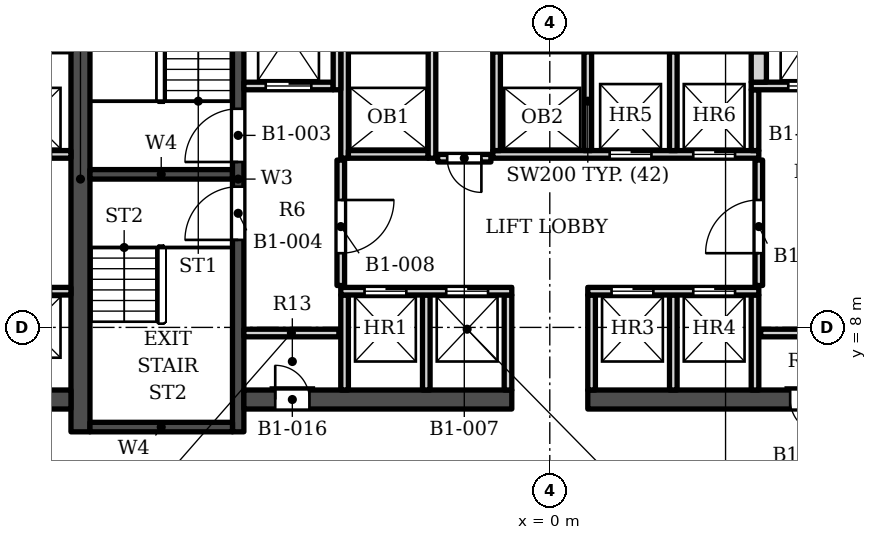
"""IFC4 building model, lengths in metres.
Left out: names, types, materials, properties, quantities, classifications, styles, units other than length and angle.
Written with IfcOpenShell. Run it as: python <this file> out.ifc"""

import sys

from ifc_helpers import new_model, si_unit, direction, frame, frame_2d, origin, place, context, subcontext, project, spatial, rectangle, extrude, element, fill, save


model = new_model("IFC4")
c1 = context("Model", 3, precision=1e-05, world=origin(), true_north=direction((0.0, 1.0)))
c2 = subcontext(c1, "Body", "Model", "MODEL_VIEW")
j1 = project(units=[si_unit("LENGTHUNIT", "METRE"), si_unit("PLANEANGLEUNIT", "RADIAN")], contexts=[c1])
p1 = place(None, origin())
s1 = spatial("IfcSite", under=j1, at=p1, CompositionType="ELEMENT")
p2 = place(p1, origin())
s2 = spatial("IfcBuilding", under=s1, at=p2, CompositionType="ELEMENT")
p3 = place(p2, frame((0.0, 0.0, -5.0)))
s3 = spatial("IfcBuildingStorey", under=s2, at=p3, CompositionType="ELEMENT", Elevation=-5.0)
p4 = place(p3, frame((-12.35, 5.253, 0.0), z_axis=(0.0, 0.0, 1.0), x_axis=(0.0, 1.0, 0.0)))
e1 = element("IfcWall", 1, at=p4, inside=s3, PredefinedType="SHEAR", context=c2, shape_type="SweptSolid", body=[
    extrude(rectangle(XDim=13.3, YDim=0.5, at=frame_2d((6.65, 0.0))), origin(), (0.0, 0.0, 1.0), 5.0),
])
p5 = place(p3, frame((-8.2, 5.253, 0.0), z_axis=(0.0, 0.0, 1.0), x_axis=(0.0, 1.0, 0.0)))
e2 = element("IfcWall", 2, at=p5, inside=s3, PredefinedType="SHEAR", context=c2, shape_type="SweptSolid", body=[
    extrude(rectangle(XDim=13.3, YDim=0.3, at=frame_2d((6.65, 0.0))), origin(), (0.0, 0.0, 1.0), 5.0),
])
p6 = place(p5, frame((7.1, 0.0, 0.0)))
e3 = element("IfcOpeningElement", 3, at=p6, cuts=e2, PredefinedType="OPENING", context=c2, shape_type="SweptSolid", body=[
    extrude(rectangle(XDim=1.4, YDim=2.1, at=frame_2d((0.7, 1.05))), frame((0.0, 0.16, 0.0), z_axis=(0.0, -1.0, 0.0), x_axis=(1.0, 0.0, 0.0)), (0.0, 0.0, 1.0), 0.32),
])
p7 = place(p5, frame((5.05, 0.0, 0.0)))
e4 = element("IfcOpeningElement", 4, at=p7, cuts=e2, PredefinedType="OPENING", context=c2, shape_type="SweptSolid", body=[
    extrude(rectangle(XDim=1.4, YDim=2.1, at=frame_2d((0.7, 1.05))), frame((0.0, 0.16, 0.0), z_axis=(0.0, -1.0, 0.0), x_axis=(1.0, 0.0, 0.0)), (0.0, 0.0, 1.0), 0.32),
])
for number, where, z_axis, x_axis in (
    (5, (-12.1, 12.028, 0.0), (0.0, 0.0, 1.0), (1.0, 0.0, 0.0)),
    (6, (-12.1, 5.378, 0.0), (0.0, 0.0, 1.0), (1.0, 0.0, 0.0)),
):
    element("IfcWall", number, at=place(p3, frame(where, z_axis=z_axis, x_axis=x_axis)), inside=s3, PredefinedType="SHEAR", context=c2, shape_type="SweptSolid", body=[
        extrude(rectangle(XDim=3.75, YDim=0.25, at=frame_2d((1.875, 0.0))), origin(), (0.0, 0.0, 1.0), 5.0),
    ])
p8 = place(p3, frame((-8.05, 6.103, 0.0), z_axis=(0.0, 0.0, 1.0), x_axis=(1.0, 0.0, 0.0)))
e7 = element("IfcWall", 7, at=p8, inside=s3, PredefinedType="SHEAR", context=c2, shape_type="SweptSolid", body=[
    extrude(rectangle(XDim=7.05, YDim=0.5, at=frame_2d((3.525, 0.0))), origin(), (0.0, 0.0, 1.0), 5.0),
])
p9 = place(p8, frame((0.825, 0.0, 0.0)))
e8 = element("IfcOpeningElement", 8, at=p9, cuts=e7, PredefinedType="OPENING", context=c2, shape_type="SweptSolid", body=[
    extrude(rectangle(XDim=0.9, YDim=2.1, at=frame_2d((0.45, 1.05))), frame((0.0, 0.26, 0.0), z_axis=(0.0, -1.0, 0.0), x_axis=(1.0, 0.0, 0.0)), (0.0, 0.0, 1.0), 0.52),
])
p10 = place(p3, frame((1.0, 6.103, 0.0), z_axis=(0.0, 0.0, 1.0), x_axis=(1.0, 0.0, 0.0)))
e9 = element("IfcWall", 9, at=p10, inside=s3, PredefinedType="SHEAR", context=c2, shape_type="SweptSolid", body=[
    extrude(rectangle(XDim=7.05, YDim=0.5, at=frame_2d((3.525, 0.0))), origin(), (0.0, 0.0, 1.0), 5.0),
])
p11 = place(p10, frame((5.325, 0.0, 0.0)))
e10 = element("IfcOpeningElement", 10, at=p11, cuts=e9, PredefinedType="OPENING", context=c2, shape_type="SweptSolid", body=[
    extrude(rectangle(XDim=0.9, YDim=2.1, at=frame_2d((0.45, 1.05))), frame((0.0, 0.26, 0.0), z_axis=(0.0, -1.0, 0.0), x_axis=(1.0, 0.0, 0.0)), (0.0, 0.0, 1.0), 0.52),
])
p12 = place(p3, frame((-12.6, 6.103, 0.0), z_axis=(0.0, 0.0, 1.0), x_axis=(-1.0, 0.0, 0.0)))
e11 = element("IfcWall", 11, at=p12, inside=s3, PredefinedType="SHEAR", context=c2, shape_type="SweptSolid", body=[
    extrude(rectangle(XDim=4.3, YDim=0.5, at=frame_2d((2.15, 0.0))), origin(), (0.0, 0.0, 1.0), 5.0),
])
for number, where, z_axis, x_axis in (
    (12, (-5.4, 6.353, 0.0), (0.0, 0.0, 1.0), (0.0, 1.0, 0.0)),
    (13, (-3.25, 6.353, 0.0), (0.0, 0.0, 1.0), (0.0, 1.0, 0.0)),
    (14, (-1.1, 6.353, 0.0), (0.0, 0.0, 1.0), (0.0, 1.0, 0.0)),
    (15, (1.1, 6.353, 0.0), (0.0, 0.0, 1.0), (0.0, 1.0, 0.0)),
    (16, (3.25, 6.353, 0.0), (0.0, 0.0, 1.0), (0.0, 1.0, 0.0)),
    (17, (5.4, 6.353, 0.0), (0.0, 0.0, 1.0), (0.0, 1.0, 0.0)),
    (18, (-8.05, 7.853, 0.0), (0.0, 0.0, 1.0), (1.0, 0.0, 0.0)),
    (19, (5.55, 7.853, 0.0), (0.0, 0.0, 1.0), (1.0, 0.0, 0.0)),
):
    element("IfcWall", number, at=place(p3, frame(where, z_axis=z_axis, x_axis=x_axis)), inside=s3, PredefinedType="SOLIDWALL", context=c2, shape_type="SweptSolid", body=[
        extrude(rectangle(XDim=2.5, YDim=0.2, at=frame_2d((1.25, 0.0))), origin(), (0.0, 0.0, 1.0), 4.45),
    ])
p13 = place(p3, frame((-16.9, 8.953, 0.0), z_axis=(0.0, 0.0, 1.0), x_axis=(1.0, 0.0, 0.0)))
e20 = element("IfcWall", 20, at=p13, inside=s3, PredefinedType="SOLIDWALL", context=c2, shape_type="SweptSolid", body=[
    extrude(rectangle(XDim=4.3, YDim=0.2, at=frame_2d((2.15, 0.0))), origin(), (0.0, 0.0, 1.0), 4.45),
])
p14 = place(p13, frame((2.675, 0.0, 0.0)))
e21 = element("IfcOpeningElement", 21, at=p14, cuts=e20, PredefinedType="OPENING", context=c2, shape_type="SweptSolid", body=[
    extrude(rectangle(XDim=1.1, YDim=2.1, at=frame_2d((0.55, 1.05))), frame((0.0, 0.11, 0.0), z_axis=(0.0, -1.0, 0.0), x_axis=(1.0, 0.0, 0.0)), (0.0, 0.0, 1.0), 0.22),
])
p15 = place(p13, frame((0.425, 0.0, 0.0)))
e22 = element("IfcOpeningElement", 22, at=p15, cuts=e20, PredefinedType="OPENING", context=c2, shape_type="SweptSolid", body=[
    extrude(rectangle(XDim=1.1, YDim=2.1, at=frame_2d((0.55, 1.05))), frame((0.0, 0.11, 0.0), z_axis=(0.0, -1.0, 0.0), x_axis=(1.0, 0.0, 0.0)), (0.0, 0.0, 1.0), 0.22),
])
p16 = place(p3, frame((-5.5, 8.953, 0.0), z_axis=(0.0, 0.0, 1.0), x_axis=(1.0, 0.0, 0.0)))
e23 = element("IfcWall", 23, at=p16, inside=s3, PredefinedType="SOLIDWALL", context=c2, shape_type="SweptSolid", body=[
    extrude(rectangle(XDim=4.5, YDim=0.2, at=frame_2d((2.25, 0.0))), origin(), (0.0, 0.0, 1.0), 4.45),
])
p17 = place(p16, frame((0.625, 0.0, 0.0)))
e24 = element("IfcOpeningElement", 24, at=p17, cuts=e23, PredefinedType="OPENING", context=c2, shape_type="SweptSolid", body=[
    extrude(rectangle(XDim=1.1, YDim=2.1, at=frame_2d((0.55, 1.05))), frame((0.0, 0.11, 0.0), z_axis=(0.0, -1.0, 0.0), x_axis=(1.0, 0.0, 0.0)), (0.0, 0.0, 1.0), 0.22),
])
p18 = place(p16, frame((2.775, 0.0, 0.0)))
e25 = element("IfcOpeningElement", 25, at=p18, cuts=e23, PredefinedType="OPENING", context=c2, shape_type="SweptSolid", body=[
    extrude(rectangle(XDim=1.1, YDim=2.1, at=frame_2d((0.55, 1.05))), frame((0.0, 0.11, 0.0), z_axis=(0.0, -1.0, 0.0), x_axis=(1.0, 0.0, 0.0)), (0.0, 0.0, 1.0), 0.22),
])
p19 = place(p3, frame((1.0, 8.953, 0.0), z_axis=(0.0, 0.0, 1.0), x_axis=(1.0, 0.0, 0.0)))
e26 = element("IfcWall", 26, at=p19, inside=s3, PredefinedType="SOLIDWALL", context=c2, shape_type="SweptSolid", body=[
    extrude(rectangle(XDim=4.5, YDim=0.2, at=frame_2d((2.25, 0.0))), origin(), (0.0, 0.0, 1.0), 4.45),
])
p20 = place(p19, frame((0.625, 0.0, 0.0)))
e27 = element("IfcOpeningElement", 27, at=p20, cuts=e26, PredefinedType="OPENING", context=c2, shape_type="SweptSolid", body=[
    extrude(rectangle(XDim=1.1, YDim=2.1, at=frame_2d((0.55, 1.05))), frame((0.0, 0.11, 0.0), z_axis=(0.0, -1.0, 0.0), x_axis=(1.0, 0.0, 0.0)), (0.0, 0.0, 1.0), 0.22),
])
p21 = place(p19, frame((2.775, 0.0, 0.0)))
e28 = element("IfcOpeningElement", 28, at=p21, cuts=e26, PredefinedType="OPENING", context=c2, shape_type="SweptSolid", body=[
    extrude(rectangle(XDim=1.1, YDim=2.1, at=frame_2d((0.55, 1.05))), frame((0.0, 0.11, 0.0), z_axis=(0.0, -1.0, 0.0), x_axis=(1.0, 0.0, 0.0)), (0.0, 0.0, 1.0), 0.22),
])
p22 = place(p3, frame((-5.5, 9.103, 0.0), z_axis=(0.0, 0.0, 1.0), x_axis=(0.0, 1.0, 0.0)))
e29 = element("IfcWall", 29, at=p22, inside=s3, PredefinedType="SOLIDWALL", context=c2, shape_type="SweptSolid", body=[
    extrude(rectangle(XDim=3.3, YDim=0.2, at=frame_2d((1.65, 0.0))), origin(), (0.0, 0.0, 1.0), 4.45),
])
p23 = place(p22, frame((0.85, 0.0, 0.0)))
e30 = element("IfcOpeningElement", 30, at=p23, cuts=e29, PredefinedType="OPENING", context=c2, shape_type="SweptSolid", body=[
    extrude(rectangle(XDim=1.4, YDim=2.1, at=frame_2d((0.7, 1.05))), frame((0.0, 0.11, 0.0), z_axis=(0.0, -1.0, 0.0), x_axis=(1.0, 0.0, 0.0)), (0.0, 0.0, 1.0), 0.22),
])
p24 = place(p3, frame((5.5, 9.103, 0.0), z_axis=(0.0, 0.0, 1.0), x_axis=(0.0, 1.0, 0.0)))
e31 = element("IfcWall", 31, at=p24, inside=s3, PredefinedType="SOLIDWALL", context=c2, shape_type="SweptSolid", body=[
    extrude(rectangle(XDim=3.3, YDim=0.2, at=frame_2d((1.65, 0.0))), origin(), (0.0, 0.0, 1.0), 4.45),
])
p25 = place(p24, frame((0.85, 0.0, 0.0)))
e32 = element("IfcOpeningElement", 32, at=p25, cuts=e31, PredefinedType="OPENING", context=c2, shape_type="SweptSolid", body=[
    extrude(rectangle(XDim=1.4, YDim=2.1, at=frame_2d((0.7, 1.05))), frame((0.0, 0.11, 0.0), z_axis=(0.0, -1.0, 0.0), x_axis=(1.0, 0.0, 0.0)), (0.0, 0.0, 1.0), 0.22),
])
p26 = place(p3, frame((-2.95, 12.453, 0.0), z_axis=(0.0, 0.0, 1.0), x_axis=(1.0, 0.0, 0.0)))
e33 = element("IfcWall", 33, at=p26, inside=s3, PredefinedType="SOLIDWALL", context=c2, shape_type="SweptSolid", body=[
    extrude(rectangle(XDim=1.4, YDim=0.2, at=frame_2d((0.7, 0.0))), origin(), (0.0, 0.0, 1.0), 4.45),
])
p27 = place(p26, frame((0.25, 0.0, 0.0)))
e34 = element("IfcOpeningElement", 34, at=p27, cuts=e33, PredefinedType="OPENING", context=c2, shape_type="SweptSolid", body=[
    extrude(rectangle(XDim=0.9, YDim=2.1, at=frame_2d((0.45, 1.05))), frame((0.0, 0.11, 0.0), z_axis=(0.0, -1.0, 0.0), x_axis=(1.0, 0.0, 0.0)), (0.0, 0.0, 1.0), 0.22),
])
p28 = place(p3, frame((-16.9, 12.552, 0.0), z_axis=(0.0, 0.0, 1.0), x_axis=(1.0, 0.0, 0.0)))
e35 = element("IfcWall", 35, at=p28, inside=s3, PredefinedType="SOLIDWALL", context=c2, shape_type="SweptSolid", body=[
    extrude(rectangle(XDim=4.3, YDim=0.2, at=frame_2d((2.15, 0.0))), origin(), (0.0, 0.0, 1.0), 4.45),
])
p29 = place(p28, frame((2.675, 0.0, 0.0)))
e36 = element("IfcOpeningElement", 36, at=p29, cuts=e35, PredefinedType="OPENING", context=c2, shape_type="SweptSolid", body=[
    extrude(rectangle(XDim=1.1, YDim=2.1, at=frame_2d((0.55, 1.05))), frame((0.0, 0.11, 0.0), z_axis=(0.0, -1.0, 0.0), x_axis=(1.0, 0.0, 0.0)), (0.0, 0.0, 1.0), 0.22),
])
p30 = place(p28, frame((0.425, 0.0, 0.0)))
e37 = element("IfcOpeningElement", 37, at=p30, cuts=e35, PredefinedType="OPENING", context=c2, shape_type="SweptSolid", body=[
    extrude(rectangle(XDim=1.1, YDim=2.1, at=frame_2d((0.55, 1.05))), frame((0.0, 0.11, 0.0), z_axis=(0.0, -1.0, 0.0), x_axis=(1.0, 0.0, 0.0)), (0.0, 0.0, 1.0), 0.22),
])
p31 = place(p3, frame((-5.4, 12.453, 0.0), z_axis=(0.0, 0.0, 1.0), x_axis=(0.0, 1.0, 0.0)))
e38 = element("IfcWall", 38, at=p31, inside=s3, PredefinedType="SOLIDWALL", context=c2, shape_type="SweptSolid", body=[
    extrude(rectangle(XDim=3.0, YDim=0.2, at=frame_2d((1.5, 0.0))), origin(), (0.0, 0.0, 1.0), 4.45),
])
p32 = place(p3, frame((-5.3, 12.552, 0.0), z_axis=(0.0, 0.0, 1.0), x_axis=(1.0, 0.0, 0.0)))
e39 = element("IfcWall", 39, at=p32, inside=s3, PredefinedType="SOLIDWALL", context=c2, shape_type="SweptSolid", body=[
    extrude(rectangle(XDim=2.1, YDim=0.2, at=frame_2d((1.05, 0.0))), origin(), (0.0, 0.0, 1.0), 4.45),
])
p33 = place(p3, frame((-3.1, 12.453, 0.0), z_axis=(0.0, 0.0, 1.0), x_axis=(0.0, 1.0, 0.0)))
e40 = element("IfcWall", 40, at=p33, inside=s3, PredefinedType="SOLIDWALL", context=c2, shape_type="SweptSolid", body=[
    extrude(rectangle(XDim=3.0, YDim=0.2, at=frame_2d((1.5, 0.0))), origin(), (0.0, 0.0, 1.0), 4.45),
])
p34 = place(p3, frame((-1.5, 12.552, 0.0), z_axis=(0.0, 0.0, 1.0), x_axis=(1.0, 0.0, 0.0)))
e41 = element("IfcWall", 41, at=p34, inside=s3, PredefinedType="SOLIDWALL", context=c2, shape_type="SweptSolid", body=[
    extrude(rectangle(XDim=7.0, YDim=0.2, at=frame_2d((3.5, 0.0))), origin(), (0.0, 0.0, 1.0), 4.45),
])
p35 = place(p34, frame((3.075, 0.0, 0.0)))
e42 = element("IfcOpeningElement", 42, at=p35, cuts=e41, PredefinedType="OPENING", context=c2, shape_type="SweptSolid", body=[
    extrude(rectangle(XDim=1.1, YDim=2.1, at=frame_2d((0.55, 1.05))), frame((0.0, 0.11, 0.0), z_axis=(0.0, -1.0, 0.0), x_axis=(1.0, 0.0, 0.0)), (0.0, 0.0, 1.0), 0.22),
])
p36 = place(p34, frame((5.275, 0.0, 0.0)))
e43 = element("IfcOpeningElement", 43, at=p36, cuts=e41, PredefinedType="OPENING", context=c2, shape_type="SweptSolid", body=[
    extrude(rectangle(XDim=1.1, YDim=2.1, at=frame_2d((0.55, 1.05))), frame((0.0, 0.11, 0.0), z_axis=(0.0, -1.0, 0.0), x_axis=(1.0, 0.0, 0.0)), (0.0, 0.0, 1.0), 0.22),
])
for number, where, z_axis, x_axis in (
    (44, (-1.4, 12.653, 0.0), (0.0, 0.0, 1.0), (0.0, 1.0, 0.0)),
    (45, (1.0, 12.653, 0.0), (0.0, 0.0, 1.0), (0.0, 1.0, 0.0)),
    (46, (3.25, 12.653, 0.0), (0.0, 0.0, 1.0), (0.0, 1.0, 0.0)),
):
    element("IfcWall", number, at=place(p3, frame(where, z_axis=z_axis, x_axis=x_axis)), inside=s3, PredefinedType="SOLIDWALL", context=c2, shape_type="SweptSolid", body=[
        extrude(rectangle(XDim=2.6, YDim=0.2, at=frame_2d((1.3, 0.0))), origin(), (0.0, 0.0, 1.0), 4.45),
    ])
p37 = place(p3, frame((5.4, 12.653, 0.0), z_axis=(0.0, 0.0, 1.0), x_axis=(0.0, 1.0, 0.0)))
e47 = element("IfcWall", 47, at=p37, inside=s3, PredefinedType="SOLIDWALL", context=c2, shape_type="SweptSolid", body=[
    extrude(rectangle(XDim=1.6, YDim=0.2, at=frame_2d((0.8, 0.0))), origin(), (0.0, 0.0, 1.0), 4.45),
])
p38 = place(p3, frame((-8.05, 14.353, 0.0), z_axis=(0.0, 0.0, 1.0), x_axis=(1.0, 0.0, 0.0)))
e48 = element("IfcWall", 48, at=p38, inside=s3, PredefinedType="SOLIDWALL", context=c2, shape_type="SweptSolid", body=[
    extrude(rectangle(XDim=2.35, YDim=0.2, at=frame_2d((1.175, 0.0))), origin(), (0.0, 0.0, 1.0), 4.45),
])
p39 = place(p38, frame((0.575, 0.0, 0.0)))
e49 = element("IfcOpeningElement", 49, at=p39, cuts=e48, PredefinedType="OPENING", context=c2, shape_type="SweptSolid", body=[
    extrude(rectangle(XDim=1.2, YDim=2.1, at=frame_2d((0.6, 1.05))), frame((0.0, 0.11, 0.0), z_axis=(0.0, -1.0, 0.0), x_axis=(1.0, 0.0, 0.0)), (0.0, 0.0, 1.0), 0.22),
])
p40 = place(p3, frame((-5.6, 14.253, 0.0), z_axis=(0.0, 0.0, 1.0), x_axis=(0.0, 1.0, 0.0)))
e50 = element("IfcWall", 50, at=p40, inside=s3, PredefinedType="SOLIDWALL", context=c2, shape_type="SweptSolid", body=[
    extrude(rectangle(XDim=4.3, YDim=0.2, at=frame_2d((2.15, 0.0))), origin(), (0.0, 0.0, 1.0), 4.45),
])
p41 = place(p3, frame((5.3, 14.353, 0.0), z_axis=(0.0, 0.0, 1.0), x_axis=(1.0, 0.0, 0.0)))
e51 = element("IfcWall", 51, at=p41, inside=s3, PredefinedType="SOLIDWALL", context=c2, shape_type="SweptSolid", body=[
    extrude(rectangle(XDim=2.75, YDim=0.2, at=frame_2d((1.375, 0.0))), origin(), (0.0, 0.0, 1.0), 4.45),
])
p42 = place(p41, frame((0.975, 0.0, 0.0)))
e52 = element("IfcOpeningElement", 52, at=p42, cuts=e51, PredefinedType="OPENING", context=c2, shape_type="SweptSolid", body=[
    extrude(rectangle(XDim=1.2, YDim=2.1, at=frame_2d((0.6, 1.05))), frame((0.0, 0.11, 0.0), z_axis=(0.0, -1.0, 0.0), x_axis=(1.0, 0.0, 0.0)), (0.0, 0.0, 1.0), 0.22),
])
p43 = place(p3, frame((5.5, 14.453, 0.0), z_axis=(0.0, 0.0, 1.0), x_axis=(0.0, 1.0, 0.0)))
e53 = element("IfcWall", 53, at=p43, inside=s3, PredefinedType="SOLIDWALL", context=c2, shape_type="SweptSolid", body=[
    extrude(rectangle(XDim=0.8, YDim=0.4, at=frame_2d((0.4, 0.0))), origin(), (0.0, 0.0, 1.0), 4.45),
])
p44 = place(p3, frame((-16.9, 15.353, 0.0), z_axis=(0.0, 0.0, 1.0), x_axis=(1.0, 0.0, 0.0)))
e54 = element("IfcWall", 54, at=p44, inside=s3, PredefinedType="SOLIDWALL", context=c2, shape_type="SweptSolid", body=[
    extrude(rectangle(XDim=4.3, YDim=0.2, at=frame_2d((2.15, 0.0))), origin(), (0.0, 0.0, 1.0), 4.45),
])
p45 = place(p3, frame((-5.3, 15.353, 0.0), z_axis=(0.0, 0.0, 1.0), x_axis=(1.0, 0.0, 0.0)))
e55 = element("IfcWall", 55, at=p45, inside=s3, PredefinedType="SOLIDWALL", context=c2, shape_type="SweptSolid", body=[
    extrude(rectangle(XDim=2.1, YDim=0.2, at=frame_2d((1.05, 0.0))), origin(), (0.0, 0.0, 1.0), 4.45),
])
p46 = place(p3, frame((-1.5, 15.353, 0.0), z_axis=(0.0, 0.0, 1.0), x_axis=(1.0, 0.0, 0.0)))
e56 = element("IfcWall", 56, at=p46, inside=s3, PredefinedType="SOLIDWALL", context=c2, shape_type="SweptSolid", body=[
    extrude(rectangle(XDim=7.2, YDim=0.2, at=frame_2d((3.6, 0.0))), origin(), (0.0, 0.0, 1.0), 4.45),
])
p47 = place(p17, origin())
e57 = element("IfcDoor", 57, at=p47, inside=s3, OperationType="DOUBLE_DOOR_SLIDING", PredefinedType="DOOR", context=c2, shape_type="SweptSolid", body=[
    extrude(rectangle(XDim=1.1, YDim=2.1, at=frame_2d((0.55, 1.05))), frame((0.0, 0.025, 0.0), z_axis=(0.0, -1.0, 0.0), x_axis=(1.0, 0.0, 0.0)), (0.0, 0.0, 1.0), 0.05),
])
fill(e24, e57)
p48 = place(p18, origin())
e58 = element("IfcDoor", 58, at=p48, inside=s3, OperationType="DOUBLE_DOOR_SLIDING", PredefinedType="DOOR", context=c2, shape_type="SweptSolid", body=[
    extrude(rectangle(XDim=1.1, YDim=2.1, at=frame_2d((0.55, 1.05))), frame((0.0, 0.025, 0.0), z_axis=(0.0, -1.0, 0.0), x_axis=(1.0, 0.0, 0.0)), (0.0, 0.0, 1.0), 0.05),
])
fill(e25, e58)
p49 = place(p20, origin())
e59 = element("IfcDoor", 59, at=p49, inside=s3, OperationType="DOUBLE_DOOR_SLIDING", PredefinedType="DOOR", context=c2, shape_type="SweptSolid", body=[
    extrude(rectangle(XDim=1.1, YDim=2.1, at=frame_2d((0.55, 1.05))), frame((0.0, 0.025, 0.0), z_axis=(0.0, -1.0, 0.0), x_axis=(1.0, 0.0, 0.0)), (0.0, 0.0, 1.0), 0.05),
])
fill(e27, e59)
p50 = place(p21, origin())
e60 = element("IfcDoor", 60, at=p50, inside=s3, OperationType="DOUBLE_DOOR_SLIDING", PredefinedType="DOOR", context=c2, shape_type="SweptSolid", body=[
    extrude(rectangle(XDim=1.1, YDim=2.1, at=frame_2d((0.55, 1.05))), frame((0.0, 0.025, 0.0), z_axis=(0.0, -1.0, 0.0), x_axis=(1.0, 0.0, 0.0)), (0.0, 0.0, 1.0), 0.05),
])
fill(e28, e60)
p51 = place(p35, origin())
e61 = element("IfcDoor", 61, at=p51, inside=s3, OperationType="DOUBLE_DOOR_SLIDING", PredefinedType="DOOR", context=c2, shape_type="SweptSolid", body=[
    extrude(rectangle(XDim=1.1, YDim=2.1, at=frame_2d((0.55, 1.05))), frame((0.0, 0.025, 0.0), z_axis=(0.0, -1.0, 0.0), x_axis=(1.0, 0.0, 0.0)), (0.0, 0.0, 1.0), 0.05),
])
fill(e42, e61)
p52 = place(p36, origin())
e62 = element("IfcDoor", 62, at=p52, inside=s3, OperationType="DOUBLE_DOOR_SLIDING", PredefinedType="DOOR", context=c2, shape_type="SweptSolid", body=[
    extrude(rectangle(XDim=1.1, YDim=2.1, at=frame_2d((0.55, 1.05))), frame((0.0, 0.025, 0.0), z_axis=(0.0, -1.0, 0.0), x_axis=(1.0, 0.0, 0.0)), (0.0, 0.0, 1.0), 0.05),
])
fill(e43, e62)
p53 = place(p39, origin())
e63 = element("IfcDoor", 63, at=p53, inside=s3, OperationType="DOUBLE_DOOR_SLIDING", PredefinedType="DOOR", context=c2, shape_type="SweptSolid", body=[
    extrude(rectangle(XDim=1.2, YDim=2.1, at=frame_2d((0.6, 1.05))), frame((0.0, 0.025, 0.0), z_axis=(0.0, -1.0, 0.0), x_axis=(1.0, 0.0, 0.0)), (0.0, 0.0, 1.0), 0.05),
])
fill(e49, e63)
p54 = place(p42, origin())
e64 = element("IfcDoor", 64, at=p54, inside=s3, OperationType="DOUBLE_DOOR_SLIDING", PredefinedType="DOOR", context=c2, shape_type="SweptSolid", body=[
    extrude(rectangle(XDim=1.2, YDim=2.1, at=frame_2d((0.6, 1.05))), frame((0.0, 0.025, 0.0), z_axis=(0.0, -1.0, 0.0), x_axis=(1.0, 0.0, 0.0)), (0.0, 0.0, 1.0), 0.05),
])
fill(e52, e64)
p55 = place(p6, origin())
e65 = element("IfcDoor", 65, at=p55, inside=s3, OperationType="SINGLE_SWING_LEFT", PredefinedType="DOOR", context=c2, shape_type="SweptSolid", body=[
    extrude(rectangle(XDim=1.4, YDim=2.1, at=frame_2d((0.7, 1.05))), frame((0.0, 0.025, 0.0), z_axis=(0.0, -1.0, 0.0), x_axis=(1.0, 0.0, 0.0)), (0.0, 0.0, 1.0), 0.05),
])
fill(e3, e65)
p56 = place(p7, origin())
e66 = element("IfcDoor", 66, at=p56, inside=s3, OperationType="SINGLE_SWING_LEFT", PredefinedType="DOOR", context=c2, shape_type="SweptSolid", body=[
    extrude(rectangle(XDim=1.4, YDim=2.1, at=frame_2d((0.7, 1.05))), frame((0.0, 0.025, 0.0), z_axis=(0.0, -1.0, 0.0), x_axis=(1.0, 0.0, 0.0)), (0.0, 0.0, 1.0), 0.05),
])
fill(e4, e66)
p57 = place(p27, origin())
e67 = element("IfcDoor", 67, at=p57, inside=s3, OperationType="SINGLE_SWING_RIGHT", PredefinedType="DOOR", context=c2, shape_type="SweptSolid", body=[
    extrude(rectangle(XDim=0.9, YDim=2.1, at=frame_2d((0.45, 1.05))), frame((0.0, 0.025, 0.0), z_axis=(0.0, -1.0, 0.0), x_axis=(1.0, 0.0, 0.0)), (0.0, 0.0, 1.0), 0.05),
])
fill(e34, e67)
p58 = place(p23, origin())
e68 = element("IfcDoor", 68, at=p58, inside=s3, OperationType="SINGLE_SWING_RIGHT", PredefinedType="DOOR", context=c2, shape_type="SweptSolid", body=[
    extrude(rectangle(XDim=1.4, YDim=2.1, at=frame_2d((0.7, 1.05))), frame((0.0, 0.025, 0.0), z_axis=(0.0, -1.0, 0.0), x_axis=(1.0, 0.0, 0.0)), (0.0, 0.0, 1.0), 0.05),
])
fill(e30, e68)
p59 = place(p25, origin())
e69 = element("IfcDoor", 69, at=p59, inside=s3, OperationType="SINGLE_SWING_LEFT", PredefinedType="DOOR", context=c2, shape_type="SweptSolid", body=[
    extrude(rectangle(XDim=1.4, YDim=2.1, at=frame_2d((0.7, 1.05))), frame((0.0, 0.025, 0.0), z_axis=(0.0, -1.0, 0.0), x_axis=(1.0, 0.0, 0.0)), (0.0, 0.0, 1.0), 0.05),
])
fill(e32, e69)
p60 = place(p9, origin())
e70 = element("IfcDoor", 70, at=p60, inside=s3, OperationType="SINGLE_SWING_LEFT", PredefinedType="DOOR", context=c2, shape_type="SweptSolid", body=[
    extrude(rectangle(XDim=0.9, YDim=2.1, at=frame_2d((0.45, 1.05))), frame((0.0, 0.025, 0.0), z_axis=(0.0, -1.0, 0.0), x_axis=(1.0, 0.0, 0.0)), (0.0, 0.0, 1.0), 0.05),
])
fill(e8, e70)
p61 = place(p11, origin())
e71 = element("IfcDoor", 71, at=p61, inside=s3, OperationType="SINGLE_SWING_RIGHT", PredefinedType="DOOR", context=c2, shape_type="SweptSolid", body=[
    extrude(rectangle(XDim=0.9, YDim=2.1, at=frame_2d((0.45, 1.05))), frame((0.0, 0.025, 0.0), z_axis=(0.0, -1.0, 0.0), x_axis=(1.0, 0.0, 0.0)), (0.0, 0.0, 1.0), 0.05),
])
fill(e10, e71)
save(model, sys.argv[1])
